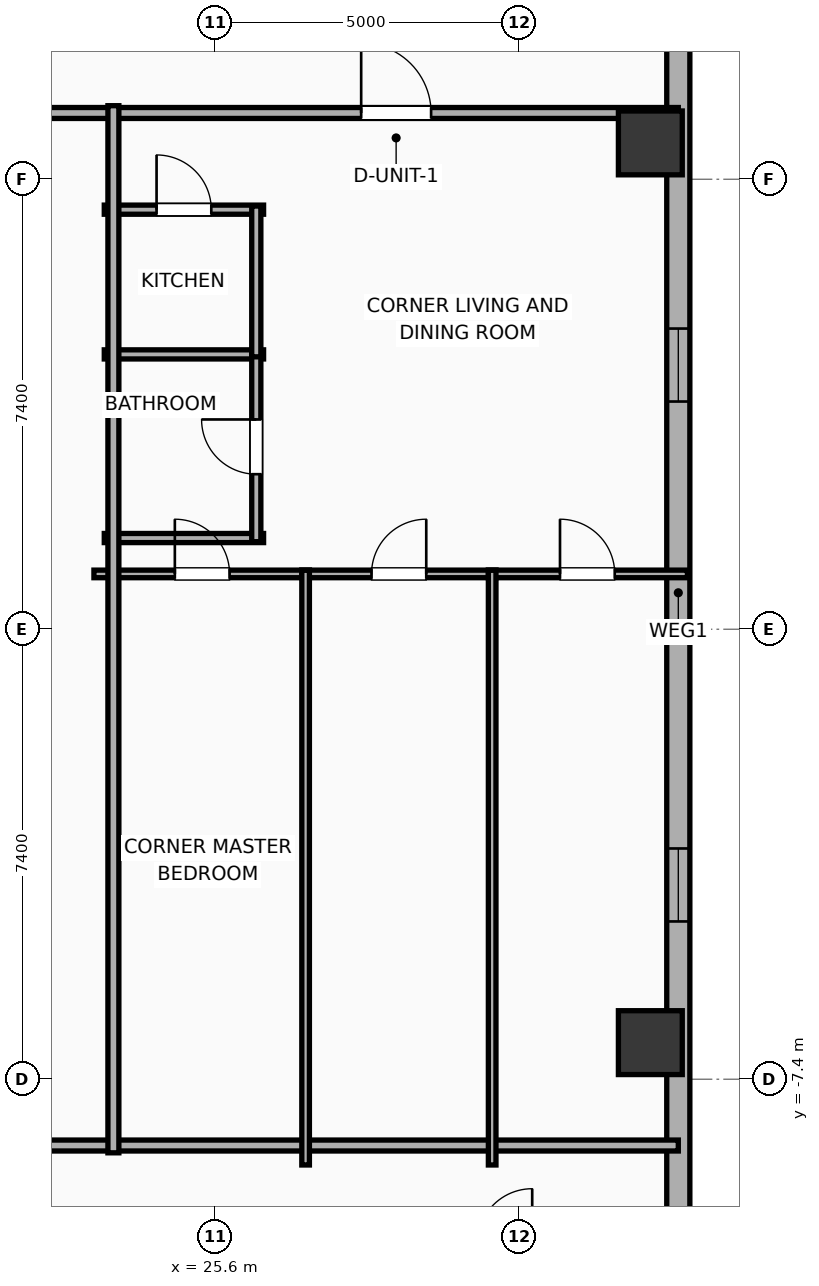
"""IFC4 building model, lengths in metres.
Left out: names, types, materials, properties, quantities, classifications, styles, units other than length and angle.
Written with IfcOpenShell. Run it as: python <this file> out.ifc"""

import sys

from ifc_helpers import new_model, si_unit, direction, frame, frame_2d, origin, origin_2d, place, context, subcontext, project, spatial, rectangle, hollow_rectangle, extrude, element, fill, save


model = new_model("IFC4")
c1 = context("Model", 3, precision=1e-05, world=origin(), true_north=direction((0.0, 1.0)))
c2 = subcontext(c1, "Body", "Model", "MODEL_VIEW")
j1 = project(units=[si_unit("LENGTHUNIT", "METRE"), si_unit("PLANEANGLEUNIT", "RADIAN")], contexts=[c1])
p1 = place(None, origin())
s1 = spatial("IfcSite", under=j1, at=p1, CompositionType="ELEMENT")
p2 = place(p1, origin())
s2 = spatial("IfcBuilding", under=s1, at=p2, CompositionType="ELEMENT")
p3 = place(p2, frame((0.0, 0.0, 101.4)))
s3 = spatial("IfcBuildingStorey", under=s2, at=p3, CompositionType="ELEMENT", Elevation=101.4)
for number, where, z_axis, x_axis in (
    (1, (32.75, -6.798, 0.0), (0.0, 0.0, 1.0), (1.0, 0.0, 0.0)),
    (2, (32.75, 7.998, 0.0), (0.0, 0.0, 1.0), (1.0, 0.0, 0.0)),
):
    element("IfcColumn", number, at=place(p3, frame(where, z_axis=z_axis, x_axis=x_axis)), inside=s3, PredefinedType="COLUMN", context=c2, shape_type="SweptSolid", body=[
        extrude(hollow_rectangle(XDim=1.05, YDim=1.05, WallThickness=0.036, at=origin_2d()), origin(), (0.0, 0.0, 1.0), 3.9),
    ])
p4 = place(p3, frame((33.21, 17.781, 0.0), z_axis=(0.0, 0.0, 1.0), x_axis=(0.0, -1.0, 0.0)))
e3 = element("IfcWall", 3, at=p4, inside=s3, PredefinedType="ELEMENTEDWALL", context=c2, shape_type="SweptSolid", body=[
    extrude(rectangle(XDim=34.363, YDim=0.38, at=frame_2d((17.181, 0.0))), origin(), (0.0, 0.0, 1.0), 3.65),
])
p5 = place(p4, frame((12.836, 0.0, 0.75)))
e4 = element("IfcOpeningElement", 4, at=p5, cuts=e3, PredefinedType="OPENING", context=c2, shape_type="SweptSolid", body=[
    extrude(rectangle(XDim=1.2, YDim=2.05, at=frame_2d((0.6, 1.025))), frame((0.0, 0.2, 0.0), z_axis=(0.0, -1.0, 0.0), x_axis=(1.0, 0.0, 0.0)), (0.0, 0.0, 1.0), 0.4),
])
p6 = place(p4, frame((21.386, 0.0, 0.75)))
e5 = element("IfcOpeningElement", 5, at=p6, cuts=e3, PredefinedType="OPENING", context=c2, shape_type="SweptSolid", body=[
    extrude(rectangle(XDim=1.2, YDim=2.05, at=frame_2d((0.6, 1.025))), frame((0.0, 0.2, 0.0), z_axis=(0.0, -1.0, 0.0), x_axis=(1.0, 0.0, 0.0)), (0.0, 0.0, 1.0), 0.4),
])
p7 = place(p3, frame((9.88, 8.49, 0.0), z_axis=(0.0, 0.0, 1.0), x_axis=(1.0, 0.0, 0.0)))
e6 = element("IfcWall", 6, at=p7, inside=s3, PredefinedType="PARTITIONING", context=c2, shape_type="SweptSolid", body=[
    extrude(rectangle(XDim=23.33, YDim=0.18, at=frame_2d((11.665, 0.0))), origin(), (0.0, 0.0, 1.0), 3.65),
])
p8 = place(p7, frame((18.115, 0.0, 0.0)))
e7 = element("IfcOpeningElement", 7, at=p8, cuts=e6, PredefinedType="OPENING", context=c2, shape_type="SweptSolid", body=[
    extrude(rectangle(XDim=1.15, YDim=2.05, at=frame_2d((0.575, 1.025))), frame((0.0, 0.1, 0.0), z_axis=(0.0, -1.0, 0.0), x_axis=(1.0, 0.0, 0.0)), (0.0, 0.0, 1.0), 0.2),
])
p9 = place(p3, frame((9.88, -8.49, 0.0), z_axis=(0.0, 0.0, 1.0), x_axis=(1.0, 0.0, 0.0)))
e8 = element("IfcWall", 8, at=p9, inside=s3, PredefinedType="PARTITIONING", context=c2, shape_type="SweptSolid", body=[
    extrude(rectangle(XDim=23.33, YDim=0.18, at=frame_2d((11.665, 0.0))), origin(), (0.0, 0.0, 1.0), 3.65),
])
p10 = place(p3, frame((23.77, 6.9, 0.0), z_axis=(0.0, 0.0, 1.0), x_axis=(1.0, 0.0, 0.0)))
e9 = element("IfcWall", 9, at=p10, inside=s3, PredefinedType="PLUMBINGWALL", context=c2, shape_type="SweptSolid", body=[
    extrude(rectangle(XDim=2.62, YDim=0.15, at=frame_2d((1.31, 0.0))), origin(), (0.0, 0.0, 1.0), 3.65),
])
p11 = place(p10, frame((0.86, 0.0, 0.0)))
e10 = element("IfcOpeningElement", 10, at=p11, cuts=e9, PredefinedType="OPENING", context=c2, shape_type="SweptSolid", body=[
    extrude(rectangle(XDim=0.9, YDim=2.05, at=frame_2d((0.45, 1.025))), frame((0.0, 0.085, 0.0), z_axis=(0.0, -1.0, 0.0), x_axis=(1.0, 0.0, 0.0)), (0.0, 0.0, 1.0), 0.17),
])
for number, where, z_axis, x_axis in (
    (11, (23.77, 4.52, 0.0), (0.0, 0.0, 1.0), (1.0, 0.0, 0.0)),
    (12, (23.77, 1.5, 0.0), (0.0, 0.0, 1.0), (1.0, 0.0, 0.0)),
):
    element("IfcWall", number, at=place(p3, frame(where, z_axis=z_axis, x_axis=x_axis)), inside=s3, PredefinedType="PLUMBINGWALL", context=c2, shape_type="SweptSolid", body=[
        extrude(rectangle(XDim=2.62, YDim=0.15, at=frame_2d((1.31, 0.0))), origin(), (0.0, 0.0, 1.0), 3.65),
    ])
p12 = place(p3, frame((26.27, 1.44, 0.0), z_axis=(0.0, 0.0, 1.0), x_axis=(0.0, 1.0, 0.0)))
e13 = element("IfcWall", 13, at=p12, inside=s3, PredefinedType="PLUMBINGWALL", context=c2, shape_type="SweptSolid", body=[
    extrude(rectangle(XDim=3.12, YDim=0.15, at=frame_2d((1.56, 0.0))), origin(), (0.0, 0.0, 1.0), 3.65),
])
p13 = place(p12, frame((1.11, 0.0, 0.0)))
e14 = element("IfcOpeningElement", 14, at=p13, cuts=e13, PredefinedType="OPENING", context=c2, shape_type="SweptSolid", body=[
    extrude(rectangle(XDim=0.9, YDim=2.05, at=frame_2d((0.45, 1.025))), frame((0.0, 0.085, 0.0), z_axis=(0.0, -1.0, 0.0), x_axis=(1.0, 0.0, 0.0)), (0.0, 0.0, 1.0), 0.17),
])
p14 = place(p3, frame((26.27, 4.48, 0.0), z_axis=(0.0, 0.0, 1.0), x_axis=(0.0, 1.0, 0.0)))
e15 = element("IfcWall", 15, at=p14, inside=s3, PredefinedType="PLUMBINGWALL", context=c2, shape_type="SweptSolid", body=[
    extrude(rectangle(XDim=2.48, YDim=0.15, at=frame_2d((1.24, 0.0))), origin(), (0.0, 0.0, 1.0), 3.65),
])
p15 = place(p3, frame((23.6, 0.91, 0.0), z_axis=(0.0, 0.0, 1.0), x_axis=(1.0, 0.0, 0.0)))
e16 = element("IfcWall", 16, at=p15, inside=s3, PredefinedType="PARTITIONING", context=c2, shape_type="SweptSolid", body=[
    extrude(rectangle(XDim=3.543, YDim=0.125, at=frame_2d((1.772, 0.0))), origin(), (0.0, 0.0, 1.0), 3.65),
])
p16 = place(p15, frame((1.331, 0.0, 0.0)))
e17 = element("IfcOpeningElement", 17, at=p16, cuts=e16, PredefinedType="OPENING", context=c2, shape_type="SweptSolid", body=[
    extrude(rectangle(XDim=0.9, YDim=2.05, at=frame_2d((0.45, 1.025))), frame((0.0, 0.073, 0.0), z_axis=(0.0, -1.0, 0.0), x_axis=(1.0, 0.0, 0.0)), (0.0, 0.0, 1.0), 0.145),
])
p17 = place(p3, frame((27.019, 0.91, 0.0), z_axis=(0.0, 0.0, 1.0), x_axis=(1.0, 0.0, 0.0)))
e18 = element("IfcWall", 18, at=p17, inside=s3, PredefinedType="PARTITIONING", context=c2, shape_type="SweptSolid", body=[
    extrude(rectangle(XDim=3.193, YDim=0.125, at=frame_2d((1.596, 0.0))), origin(), (0.0, 0.0, 1.0), 3.65),
])
p18 = place(p17, frame((1.146, 0.0, 0.0)))
e19 = element("IfcOpeningElement", 19, at=p18, cuts=e18, PredefinedType="OPENING", context=c2, shape_type="SweptSolid", body=[
    extrude(rectangle(XDim=0.9, YDim=2.05, at=frame_2d((0.45, 1.025))), frame((0.0, 0.073, 0.0), z_axis=(0.0, -1.0, 0.0), x_axis=(1.0, 0.0, 0.0)), (0.0, 0.0, 1.0), 0.145),
])
p19 = place(p3, frame((30.086, 0.91, 0.0), z_axis=(0.0, 0.0, 1.0), x_axis=(1.0, 0.0, 0.0)))
e20 = element("IfcWall", 20, at=p19, inside=s3, PredefinedType="PARTITIONING", context=c2, shape_type="SweptSolid", body=[
    extrude(rectangle(XDim=3.274, YDim=0.125, at=frame_2d((1.637, 0.0))), origin(), (0.0, 0.0, 1.0), 3.65),
])
p20 = place(p19, frame((1.178, 0.0, 0.0)))
e21 = element("IfcOpeningElement", 21, at=p20, cuts=e20, PredefinedType="OPENING", context=c2, shape_type="SweptSolid", body=[
    extrude(rectangle(XDim=0.9, YDim=2.05, at=frame_2d((0.45, 1.025))), frame((0.0, 0.073, 0.0), z_axis=(0.0, -1.0, 0.0), x_axis=(1.0, 0.0, 0.0)), (0.0, 0.0, 1.0), 0.145),
])
for number, where, z_axis, x_axis in (
    (22, (30.149, -8.81, 0.0), (0.0, 0.0, 1.0), (0.0, 1.0, 0.0)),
    (23, (27.081, -8.81, 0.0), (0.0, 0.0, 1.0), (0.0, 1.0, 0.0)),
):
    element("IfcWall", number, at=place(p3, frame(where, z_axis=z_axis, x_axis=x_axis)), inside=s3, PredefinedType="PARTITIONING", context=c2, shape_type="SweptSolid", body=[
        extrude(rectangle(XDim=9.78, YDim=0.125, at=frame_2d((4.89, 0.0))), origin(), (0.0, 0.0, 1.0), 3.65),
    ])
p21 = place(p3, frame((23.92, -8.61, 0.0), z_axis=(0.0, 0.0, 1.0), x_axis=(0.0, 1.0, 0.0)))
e24 = element("IfcWall", 24, at=p21, inside=s3, PredefinedType="PARTITIONING", context=c2, shape_type="SweptSolid", body=[
    extrude(rectangle(XDim=17.22, YDim=0.18, at=frame_2d((8.61, 0.0))), origin(), (0.0, 0.0, 1.0), 3.65),
])
p22 = place(p5, origin())
e25 = element("IfcWindow", 25, at=p22, inside=s3, PartitioningType="SINGLE_PANEL", PredefinedType="WINDOW", context=c2, shape_type="SweptSolid", body=[
    extrude(rectangle(XDim=1.2, YDim=2.05, at=frame_2d((0.6, 1.025))), frame((0.0, 0.03, 0.0), z_axis=(0.0, -1.0, 0.0), x_axis=(1.0, 0.0, 0.0)), (0.0, 0.0, 1.0), 0.06),
])
fill(e4, e25)
p23 = place(p6, origin())
e26 = element("IfcWindow", 26, at=p23, inside=s3, PartitioningType="SINGLE_PANEL", PredefinedType="WINDOW", context=c2, shape_type="SweptSolid", body=[
    extrude(rectangle(XDim=1.2, YDim=2.05, at=frame_2d((0.6, 1.025))), frame((0.0, 0.03, 0.0), z_axis=(0.0, -1.0, 0.0), x_axis=(1.0, 0.0, 0.0)), (0.0, 0.0, 1.0), 0.06),
])
fill(e5, e26)
p24 = place(p8, origin())
e27 = element("IfcDoor", 27, at=p24, inside=s3, OperationType="SINGLE_SWING_LEFT", PredefinedType="DOOR", context=c2, shape_type="SweptSolid", body=[
    extrude(rectangle(XDim=1.15, YDim=2.05, at=frame_2d((0.575, 1.025))), frame((0.0, 0.025, 0.0), z_axis=(0.0, -1.0, 0.0), x_axis=(1.0, 0.0, 0.0)), (0.0, 0.0, 1.0), 0.05),
])
fill(e7, e27)
p25 = place(p11, origin())
e28 = element("IfcDoor", 28, at=p25, inside=s3, OperationType="SINGLE_SWING_LEFT", PredefinedType="DOOR", context=c2, shape_type="SweptSolid", body=[
    extrude(rectangle(XDim=0.9, YDim=2.05, at=frame_2d((0.45, 1.025))), frame((0.0, 0.025, 0.0), z_axis=(0.0, -1.0, 0.0), x_axis=(1.0, 0.0, 0.0)), (0.0, 0.0, 1.0), 0.05),
])
fill(e10, e28)
p26 = place(p13, origin())
e29 = element("IfcDoor", 29, at=p26, inside=s3, OperationType="SINGLE_SWING_RIGHT", PredefinedType="DOOR", context=c2, shape_type="SweptSolid", body=[
    extrude(rectangle(XDim=0.9, YDim=2.05, at=frame_2d((0.45, 1.025))), frame((0.0, 0.025, 0.0), z_axis=(0.0, -1.0, 0.0), x_axis=(1.0, 0.0, 0.0)), (0.0, 0.0, 1.0), 0.05),
])
fill(e14, e29)
p27 = place(p16, origin())
e30 = element("IfcDoor", 30, at=p27, inside=s3, OperationType="SINGLE_SWING_LEFT", PredefinedType="DOOR", context=c2, shape_type="SweptSolid", body=[
    extrude(rectangle(XDim=0.9, YDim=2.05, at=frame_2d((0.45, 1.025))), frame((0.0, 0.025, 0.0), z_axis=(0.0, -1.0, 0.0), x_axis=(1.0, 0.0, 0.0)), (0.0, 0.0, 1.0), 0.05),
])
fill(e17, e30)
p28 = place(p18, origin())
e31 = element("IfcDoor", 31, at=p28, inside=s3, OperationType="SINGLE_SWING_RIGHT", PredefinedType="DOOR", context=c2, shape_type="SweptSolid", body=[
    extrude(rectangle(XDim=0.9, YDim=2.05, at=frame_2d((0.45, 1.025))), frame((0.0, 0.025, 0.0), z_axis=(0.0, -1.0, 0.0), x_axis=(1.0, 0.0, 0.0)), (0.0, 0.0, 1.0), 0.05),
])
fill(e19, e31)
p29 = place(p20, origin())
e32 = element("IfcDoor", 32, at=p29, inside=s3, OperationType="SINGLE_SWING_LEFT", PredefinedType="DOOR", context=c2, shape_type="SweptSolid", body=[
    extrude(rectangle(XDim=0.9, YDim=2.05, at=frame_2d((0.45, 1.025))), frame((0.0, 0.025, 0.0), z_axis=(0.0, -1.0, 0.0), x_axis=(1.0, 0.0, 0.0)), (0.0, 0.0, 1.0), 0.05),
])
fill(e21, e32)
save(model, sys.argv[1])
